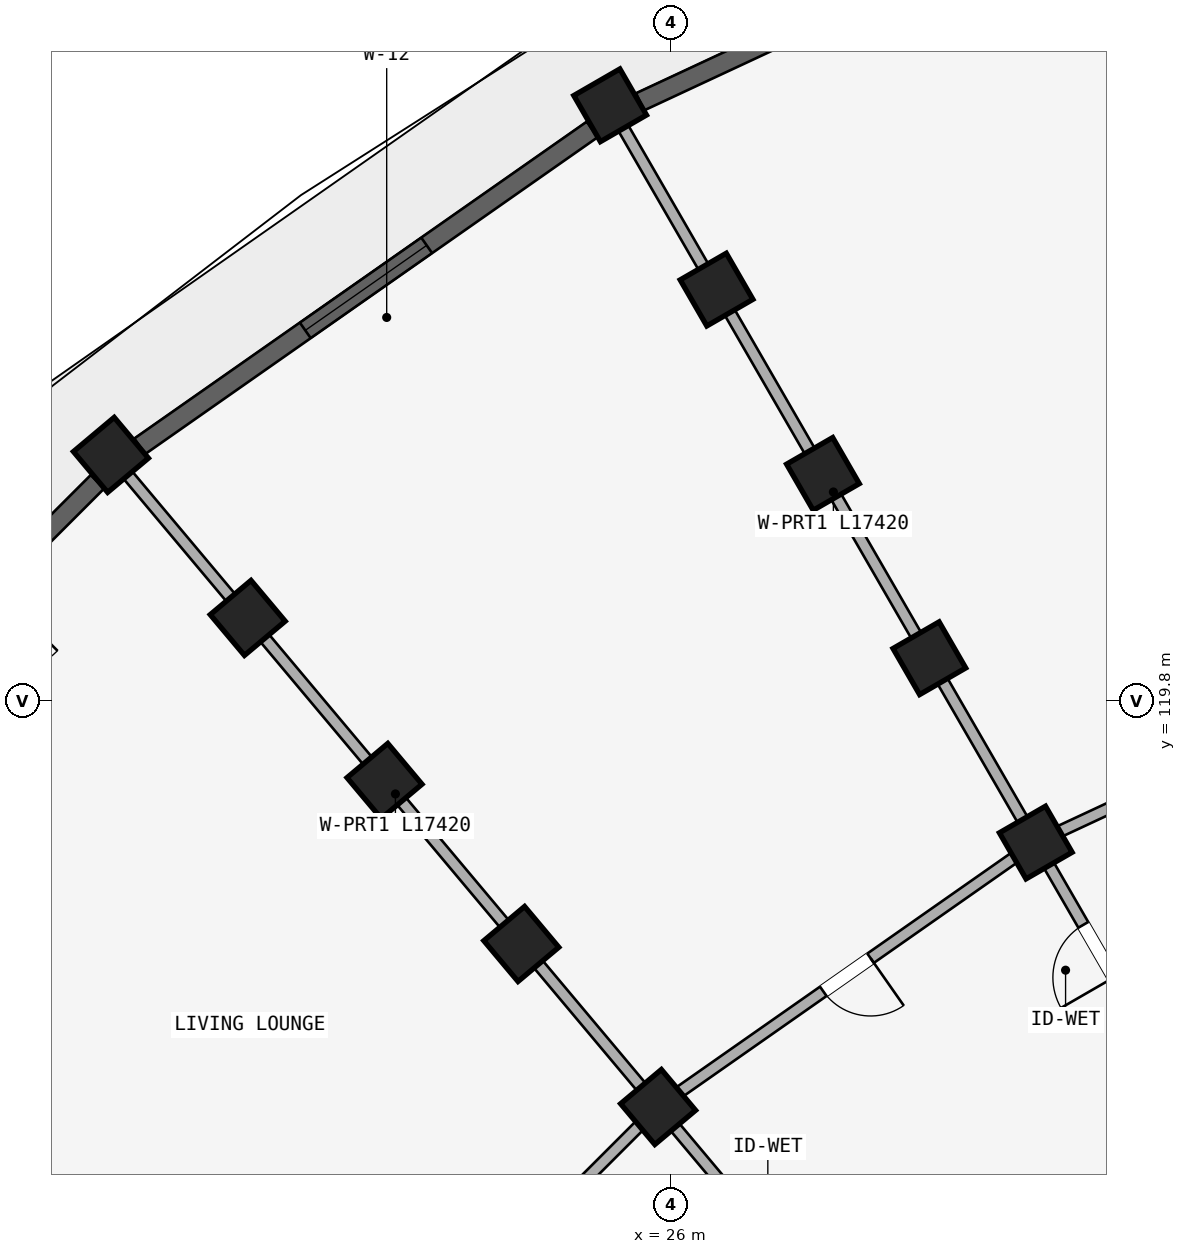
"""IFC4 building model, lengths in metres.
Left out: names, types, materials, properties, quantities, classifications, styles, units other than length and angle.
Written with IfcOpenShell. Run it as: python <this file> out.ifc"""

import sys

from ifc_helpers import new_model, si_unit, direction, frame, frame_2d, origin, origin_2d, place, context, subcontext, project, spatial, rectangle, extrude, element, fill, save


model = new_model("IFC4")
c1 = context("Model", 3, precision=1e-05, world=origin(), true_north=direction((0.0, 1.0)))
c2 = subcontext(c1, "Body", "Model", "MODEL_VIEW")
j1 = project(units=[si_unit("LENGTHUNIT", "METRE"), si_unit("PLANEANGLEUNIT", "RADIAN")], contexts=[c1])
p1 = place(None, origin())
s1 = spatial("IfcSite", under=j1, at=p1, CompositionType="ELEMENT")
p2 = place(p1, origin())
s2 = spatial("IfcBuilding", under=s1, at=p2, CompositionType="ELEMENT")
p3 = place(p2, frame((0.0, 0.0, 27.6)))
s3 = spatial("IfcBuildingStorey", under=s2, at=p3, CompositionType="ELEMENT", Elevation=27.6)
for number, where, z_axis, x_axis in (
    (1, (30.8, 117.938, 0.0), (0.0, 0.0, 1.0), (0.866, 0.5, 0.0)),
    (2, (29.4, 120.363, 0.0), (0.0, 0.0, 1.0), (0.866, 0.5, 0.0)),
    (3, (28.0, 122.787, 0.0), (0.0, 0.0, 1.0), (0.866, 0.5, 0.0)),
    (4, (26.6, 125.212, 0.0), (0.0, 0.0, 1.0), (0.866, 0.5, 0.0)),
    (5, (25.2, 127.637, 0.0), (0.0, 0.0, 1.0), (0.866, 0.5, 0.0)),
    (6, (25.831, 114.458, 0.0), (0.0, 0.0, 1.0), (0.766, 0.643, 0.0)),
    (7, (24.031, 116.603, 0.0), (0.0, 0.0, 1.0), (0.766, 0.643, 0.0)),
    (8, (22.231, 118.748, 0.0), (0.0, 0.0, 1.0), (0.766, 0.643, 0.0)),
    (9, (20.432, 120.893, 0.0), (0.0, 0.0, 1.0), (0.766, 0.643, 0.0)),
    (10, (18.632, 123.038, 0.0), (0.0, 0.0, 1.0), (0.766, 0.643, 0.0)),
):
    element("IfcColumn", number, at=place(p3, frame(where, z_axis=z_axis, x_axis=x_axis)), inside=s3, PredefinedType="COLUMN", context=c2, shape_type="SweptSolid", body=[
        extrude(rectangle(XDim=0.7, YDim=0.7, at=origin_2d()), origin(), (0.0, 0.0, 1.0), 2.93),
    ])
p4 = place(p3, frame((34.05, 112.309, 0.0), z_axis=(0.0, 0.0, 1.0), x_axis=(-0.499997843263, 0.866026648973, 0.0)))
e11 = element("IfcWall", 11, at=p4, inside=s3, PredefinedType="PARTITIONING", context=c2, shape_type="SweptSolid", body=[
    extrude(rectangle(XDim=17.42, YDim=0.15, at=frame_2d((8.71, 0.0))), origin(), (0.0, 0.0, 1.0), 2.372),
])
p5 = place(p4, frame((4.45, 0.0, 0.0)))
e12 = element("IfcOpeningElement", 12, at=p5, cuts=e11, PredefinedType="OPENING", context=c2, shape_type="SweptSolid", body=[
    extrude(rectangle(XDim=0.8, YDim=2.1, at=frame_2d((0.4, 1.05))), frame((0.0, 0.085, 0.0), z_axis=(0.0, -1.0, 0.0), x_axis=(1.0, 0.0, 0.0)), (0.0, 0.0, 1.0), 0.17),
])
p6 = place(p3, frame((30.009, 109.479, 0.0), z_axis=(0.0, 0.0, 1.0), x_axis=(-0.642784757967, 0.766046835987, 0.0)))
e13 = element("IfcWall", 13, at=p6, inside=s3, PredefinedType="PARTITIONING", context=c2, shape_type="SweptSolid", body=[
    extrude(rectangle(XDim=17.42, YDim=0.15, at=frame_2d((8.71, 0.0))), origin(), (0.0, 0.0, 1.0), 2.372),
])
p7 = place(p6, frame((4.45, 0.0, 0.0)))
e14 = element("IfcOpeningElement", 14, at=p7, cuts=e13, PredefinedType="OPENING", context=c2, shape_type="SweptSolid", body=[
    extrude(rectangle(XDim=0.8, YDim=2.1, at=frame_2d((0.4, 1.05))), frame((0.0, 0.085, 0.0), z_axis=(0.0, -1.0, 0.0), x_axis=(1.0, 0.0, 0.0)), (0.0, 0.0, 1.0), 0.17),
])
p8 = place(p3, frame((26.521, 105.991, 0.0), z_axis=(0.0, 0.0, 1.0), x_axis=(-0.766046835987, 0.642784757967, 0.0)))
e15 = element("IfcWall", 15, at=p8, inside=s3, PredefinedType="STANDARD", context=c2, shape_type="SweptSolid", body=[
    extrude(rectangle(XDim=17.42, YDim=0.22, at=frame_2d((8.71, 0.0))), origin(), (0.0, 0.0, 1.0), 2.372),
])
p9 = place(p3, frame((36.298, 120.501, 0.0), z_axis=(0.0, 0.0, 1.0), x_axis=(-0.906312656069, -0.42260781991, 0.0)))
e16 = element("IfcWall", 16, at=p9, inside=s3, PredefinedType="PLUMBINGWALL", context=c2, shape_type="SweptSolid", body=[
    extrude(rectangle(XDim=6.066, YDim=0.15, at=frame_2d((3.033, 0.0))), origin(), (0.0, 0.0, 1.0), 2.372),
])
p10 = place(p9, frame((2.613, 0.0, 0.0)))
e17 = element("IfcOpeningElement", 17, at=p10, cuts=e16, PredefinedType="OPENING", context=c2, shape_type="SweptSolid", body=[
    extrude(rectangle(XDim=0.84, YDim=2.1, at=frame_2d((0.42, 1.05))), frame((0.0, 0.085, 0.0), z_axis=(0.0, -1.0, 0.0), x_axis=(1.0, 0.0, 0.0)), (0.0, 0.0, 1.0), 0.17),
])
p11 = place(p3, frame((30.8, 117.938, 0.0), z_axis=(0.0, 0.0, 1.0), x_axis=(-0.81913926159, -0.573594691504, 0.0)))
e18 = element("IfcWall", 18, at=p11, inside=s3, PredefinedType="PLUMBINGWALL", context=c2, shape_type="SweptSolid", body=[
    extrude(rectangle(XDim=6.066, YDim=0.15, at=frame_2d((3.033, 0.0))), origin(), (0.0, 0.0, 1.0), 2.372),
])
p12 = place(p11, frame((2.653, 0.0, 0.0)))
e19 = element("IfcOpeningElement", 19, at=p12, cuts=e18, PredefinedType="OPENING", context=c2, shape_type="SweptSolid", body=[
    extrude(rectangle(XDim=0.76, YDim=2.05, at=frame_2d((0.38, 1.025))), frame((0.0, 0.085, 0.0), z_axis=(0.0, -1.0, 0.0), x_axis=(1.0, 0.0, 0.0)), (0.0, 0.0, 1.0), 0.17),
])
p13 = place(p3, frame((25.831, 114.458, 0.0), z_axis=(0.0, 0.0, 1.0), x_axis=(-0.707106781187, -0.707106781187, 0.0)))
e20 = element("IfcWall", 20, at=p13, inside=s3, PredefinedType="PLUMBINGWALL", context=c2, shape_type="SweptSolid", body=[
    extrude(rectangle(XDim=6.066, YDim=0.15, at=frame_2d((3.033, 0.0))), origin(), (0.0, 0.0, 1.0), 2.372),
])
p14 = place(p13, frame((2.633, 0.0, 0.0)))
e21 = element("IfcOpeningElement", 21, at=p14, cuts=e20, PredefinedType="OPENING", context=c2, shape_type="SweptSolid", body=[
    extrude(rectangle(XDim=0.8, YDim=2.1, at=frame_2d((0.4, 1.05))), frame((0.0, 0.085, 0.0), z_axis=(0.0, -1.0, 0.0), x_axis=(1.0, 0.0, 0.0)), (0.0, 0.0, 1.0), 0.17),
])
p15 = place(p3, frame((32.179, 130.754, 0.0), z_axis=(0.0, 0.0, 1.0), x_axis=(-0.90630327107, -0.422627946127, 0.0)))
e22 = element("IfcWall", 22, at=p15, inside=s3, PredefinedType="STANDARD", context=c2, shape_type="SweptSolid", body=[
    extrude(rectangle(XDim=7.267, YDim=0.25, at=frame_2d((3.633, 0.0))), origin(), (0.0, 0.0, 1.0), 2.472),
])
p16 = place(p15, frame((2.583, 0.0, 0.472)))
e23 = element("IfcOpeningElement", 23, at=p16, cuts=e22, PredefinedType="OPENING", context=c2, shape_type="SweptSolid", body=[
    extrude(rectangle(XDim=2.1, YDim=1.8, at=frame_2d((1.05, 0.9))), frame((0.0, 0.135, 0.0), z_axis=(0.0, -1.0, 0.0), x_axis=(1.0, 0.0, 0.0)), (0.0, 0.0, 1.0), 0.27),
])
p17 = place(p3, frame((24.964, 127.319, 0.0), z_axis=(0.0, 0.0, 1.0), x_axis=(-0.819159308599, -0.573566061701, 0.0)))
e24 = element("IfcWall", 24, at=p17, inside=s3, PredefinedType="STANDARD", context=c2, shape_type="SweptSolid", body=[
    extrude(rectangle(XDim=7.267, YDim=0.25, at=frame_2d((3.633, 0.0))), origin(), (0.0, 0.0, 1.0), 2.472),
])
p18 = place(p17, frame((2.658, 0.0, 0.422)))
e25 = element("IfcOpeningElement", 25, at=p18, cuts=e24, PredefinedType="OPENING", context=c2, shape_type="SweptSolid", body=[
    extrude(rectangle(XDim=1.95, YDim=1.85, at=frame_2d((0.975, 0.925))), frame((0.0, 0.135, 0.0), z_axis=(0.0, -1.0, 0.0), x_axis=(1.0, 0.0, 0.0)), (0.0, 0.0, 1.0), 0.27),
])
p19 = place(p3, frame((18.454, 122.684, 0.0), z_axis=(0.0, 0.0, 1.0), x_axis=(-0.707106781187, -0.707106781187, 0.0)))
e26 = element("IfcWall", 26, at=p19, inside=s3, PredefinedType="STANDARD", context=c2, shape_type="SweptSolid", body=[
    extrude(rectangle(XDim=7.267, YDim=0.25, at=frame_2d((3.633, 0.0))), origin(), (0.0, 0.0, 1.0), 2.472),
])
p20 = place(p19, frame((4.766, 0.0, 0.622)))
e27 = element("IfcOpeningElement", 27, at=p20, cuts=e26, PredefinedType="OPENING", context=c2, shape_type="SweptSolid", body=[
    extrude(rectangle(XDim=1.2, YDim=1.5, at=frame_2d((0.6, 0.75))), frame((0.0, 0.135, 0.0), z_axis=(0.0, -1.0, 0.0), x_axis=(1.0, 0.0, 0.0)), (0.0, 0.0, 1.0), 0.27),
])
p21 = place(p19, frame((1.943, 0.0, 0.0)))
e28 = element("IfcOpeningElement", 28, at=p21, cuts=e26, PredefinedType="OPENING", context=c2, shape_type="SweptSolid", body=[
    extrude(rectangle(XDim=1.2, YDim=2.15, at=frame_2d((0.6, 1.075))), frame((0.0, 0.135, 0.0), z_axis=(0.0, -1.0, 0.0), x_axis=(1.0, 0.0, 0.0)), (0.0, 0.0, 1.0), 0.27),
])
p22 = place(p18, origin())
e29 = element("IfcWindow", 29, at=p22, inside=s3, PartitioningType="DOUBLE_PANEL_VERTICAL", PredefinedType="WINDOW", context=c2, shape_type="SweptSolid", body=[
    extrude(rectangle(XDim=1.95, YDim=1.85, at=frame_2d((0.975, 0.925))), frame((0.0, 0.03, 0.0), z_axis=(0.0, -1.0, 0.0), x_axis=(1.0, 0.0, 0.0)), (0.0, 0.0, 1.0), 0.06),
])
fill(e25, e29)
p23 = place(p5, frame((0.8, 0.0, 0.0), z_axis=(0.0, 0.0, 1.0), x_axis=(-1.0, 0.0, 0.0)))
e30 = element("IfcDoor", 30, at=p23, inside=s3, OperationType="SINGLE_SWING_RIGHT", PredefinedType="DOOR", context=c2, shape_type="SweptSolid", body=[
    extrude(rectangle(XDim=0.8, YDim=2.1, at=frame_2d((0.4, 1.05))), frame((0.0, 0.025, 0.0), z_axis=(0.0, -1.0, 0.0), x_axis=(1.0, 0.0, 0.0)), (0.0, 0.0, 1.0), 0.05),
])
fill(e12, e30)
p24 = place(p12, frame((0.76, 0.0, 0.0), z_axis=(0.0, 0.0, 1.0), x_axis=(-1.0, 0.0, 0.0)))
e31 = element("IfcDoor", 31, at=p24, inside=s3, OperationType="SINGLE_SWING_RIGHT", PredefinedType="DOOR", context=c2, shape_type="SweptSolid", body=[
    extrude(rectangle(XDim=0.76, YDim=2.05, at=frame_2d((0.38, 1.025))), frame((0.0, 0.025, 0.0), z_axis=(0.0, -1.0, 0.0), x_axis=(1.0, 0.0, 0.0)), (0.0, 0.0, 1.0), 0.05),
])
fill(e19, e31)
save(model, sys.argv[1])
